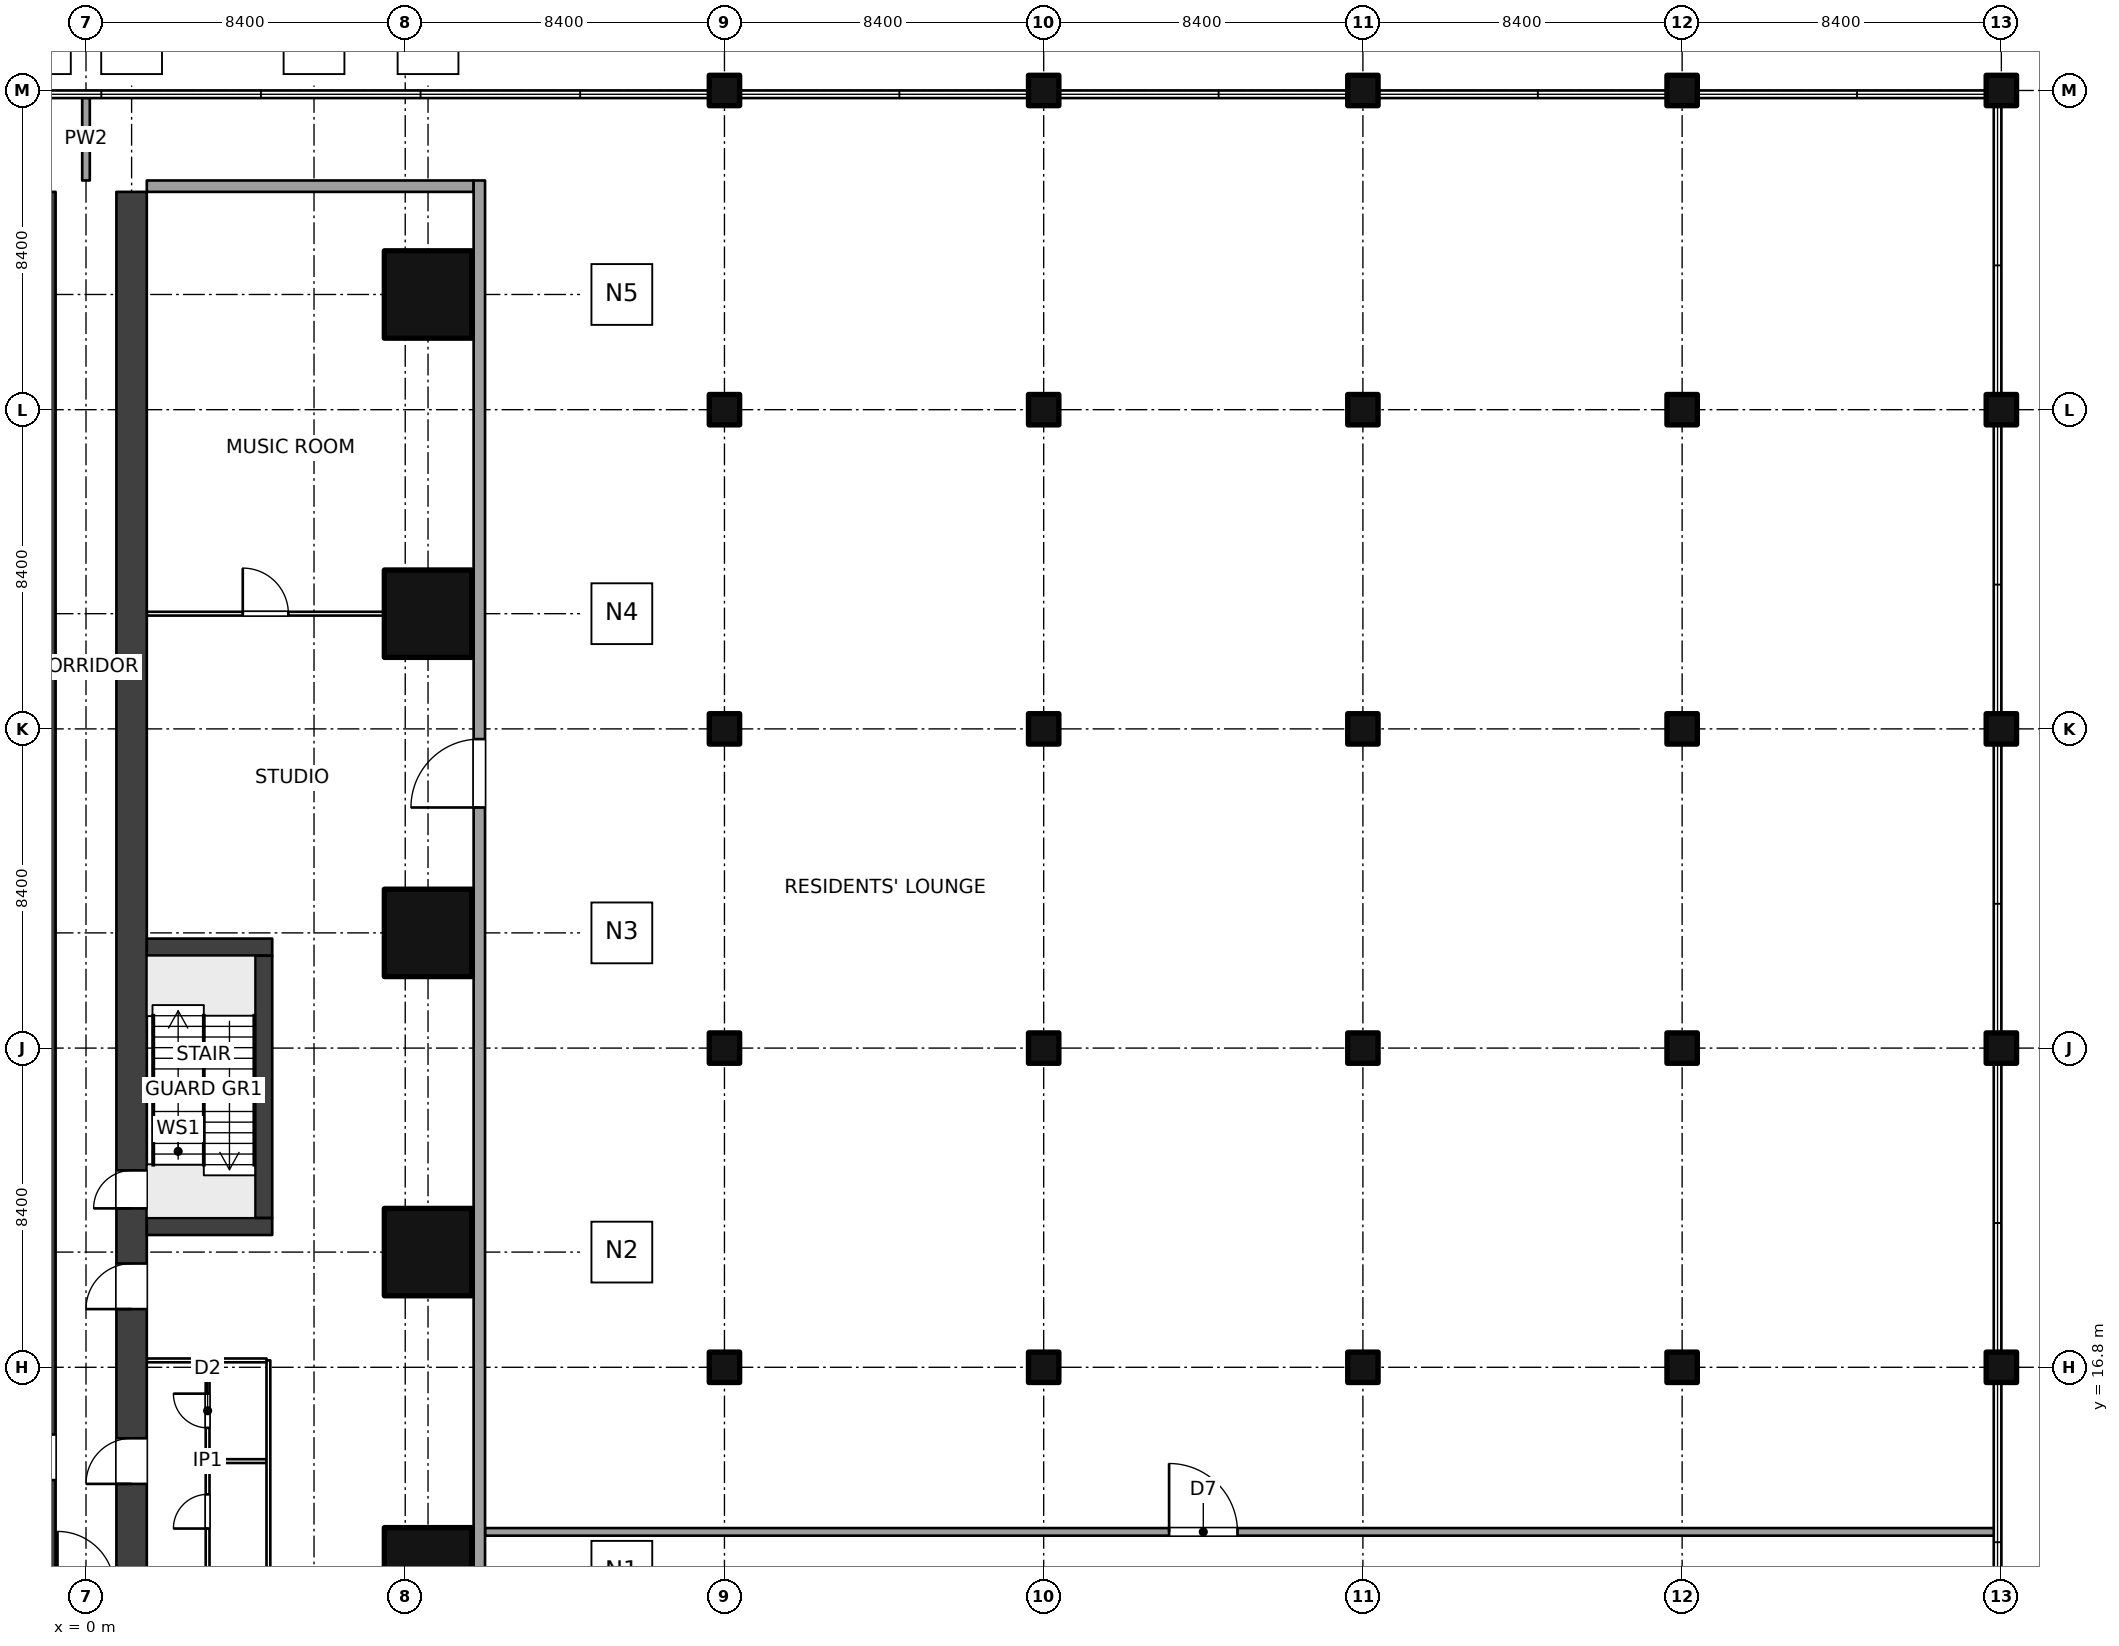
"""IFC4 building model, lengths in metres.
Left out: names, types, materials, properties, quantities, classifications, styles, units other than length and angle.
Written with IfcOpenShell. Run it as: python <this file> out.ifc"""

import sys

from ifc_helpers import new_model, si_unit, direction, frame, frame_2d, origin, origin_2d, place, context, subcontext, project, spatial, rectangle, extrude, element, fill, save


model = new_model("IFC4")
c1 = context("Model", 3, precision=1e-05, world=origin(), true_north=direction((0.0, 1.0)))
c2 = subcontext(c1, "Body", "Model", "MODEL_VIEW")
j1 = project(units=[si_unit("LENGTHUNIT", "METRE"), si_unit("PLANEANGLEUNIT", "RADIAN")], contexts=[c1])
p1 = place(None, origin())
s1 = spatial("IfcSite", under=j1, at=p1, CompositionType="ELEMENT")
p2 = place(p1, origin())
s2 = spatial("IfcBuilding", under=s1, at=p2, CompositionType="ELEMENT")
p3 = place(p2, frame((0.0, 0.0, 16.0)))
s3 = spatial("IfcBuildingStorey", under=s2, at=p3, CompositionType="ELEMENT", Elevation=16.0)
for number, where, z_axis, x_axis in (
    (1, (9.0, 11.432, 0.0), (0.0, 0.0, 1.0), (1.0, 0.0, 0.0)),
    (2, (9.0, 19.832, 0.0), (0.0, 0.0, 1.0), (1.0, 0.0, 0.0)),
    (3, (9.0, 28.231, 0.0), (0.0, 0.0, 1.0), (1.0, 0.0, 0.0)),
    (4, (9.0, 36.632, 0.0), (0.0, 0.0, 1.0), (1.0, 0.0, 0.0)),
    (5, (9.0, 45.031, 0.0), (0.0, 0.0, 1.0), (1.0, 0.0, 0.0)),
):
    element("IfcColumn", number, at=place(p3, frame(where, z_axis=z_axis, x_axis=x_axis)), inside=s3, PredefinedType="COLUMN", context=c2, shape_type="SweptSolid", body=[
        extrude(rectangle(XDim=2.3, YDim=2.3, at=origin_2d()), origin(), (0.0, 0.0, 1.0), 5.0),
    ])
for number, where, z_axis, x_axis in (
    (6, (16.8, 16.8, 0.0), (0.0, 0.0, 1.0), (1.0, 0.0, 0.0)),
    (7, (16.8, 25.2, 0.0), (0.0, 0.0, 1.0), (1.0, 0.0, 0.0)),
    (8, (16.8, 33.6, 0.0), (0.0, 0.0, 1.0), (1.0, 0.0, 0.0)),
    (9, (16.8, 42.0, 0.0), (0.0, 0.0, 1.0), (1.0, 0.0, 0.0)),
    (10, (16.8, 50.4, 0.0), (0.0, 0.0, 1.0), (1.0, 0.0, 0.0)),
    (11, (25.2, 16.8, 0.0), (0.0, 0.0, 1.0), (1.0, 0.0, 0.0)),
    (12, (25.2, 25.2, 0.0), (0.0, 0.0, 1.0), (1.0, 0.0, 0.0)),
    (13, (25.2, 33.6, 0.0), (0.0, 0.0, 1.0), (1.0, 0.0, 0.0)),
    (14, (25.2, 42.0, 0.0), (0.0, 0.0, 1.0), (1.0, 0.0, 0.0)),
    (15, (25.2, 50.4, 0.0), (0.0, 0.0, 1.0), (1.0, 0.0, 0.0)),
    (16, (33.6, 16.8, 0.0), (0.0, 0.0, 1.0), (1.0, 0.0, 0.0)),
    (17, (33.6, 25.2, 0.0), (0.0, 0.0, 1.0), (1.0, 0.0, 0.0)),
    (18, (33.6, 33.6, 0.0), (0.0, 0.0, 1.0), (1.0, 0.0, 0.0)),
    (19, (33.6, 42.0, 0.0), (0.0, 0.0, 1.0), (1.0, 0.0, 0.0)),
    (20, (33.6, 50.4, 0.0), (0.0, 0.0, 1.0), (1.0, 0.0, 0.0)),
    (21, (42.0, 16.8, 0.0), (0.0, 0.0, 1.0), (1.0, 0.0, 0.0)),
    (22, (42.0, 25.2, 0.0), (0.0, 0.0, 1.0), (1.0, 0.0, 0.0)),
    (23, (42.0, 33.6, 0.0), (0.0, 0.0, 1.0), (1.0, 0.0, 0.0)),
    (24, (42.0, 42.0, 0.0), (0.0, 0.0, 1.0), (1.0, 0.0, 0.0)),
    (25, (42.0, 50.4, 0.0), (0.0, 0.0, 1.0), (1.0, 0.0, 0.0)),
    (26, (50.4, 16.8, 0.0), (0.0, 0.0, 1.0), (1.0, 0.0, 0.0)),
    (27, (50.4, 25.2, 0.0), (0.0, 0.0, 1.0), (1.0, 0.0, 0.0)),
    (28, (50.4, 33.6, 0.0), (0.0, 0.0, 1.0), (1.0, 0.0, 0.0)),
    (29, (50.4, 42.0, 0.0), (0.0, 0.0, 1.0), (1.0, 0.0, 0.0)),
    (30, (50.4, 50.4, 0.0), (0.0, 0.0, 1.0), (1.0, 0.0, 0.0)),
):
    element("IfcColumn", number, at=place(p3, frame(where, z_axis=z_axis, x_axis=x_axis)), inside=s3, PredefinedType="COLUMN", context=c2, shape_type="SweptSolid", body=[
        extrude(rectangle(XDim=0.8, YDim=0.8, at=origin_2d()), origin(), (0.0, 0.0, 1.0), 5.0),
    ])
p4 = place(p3, frame((-1.2, 10.981, 0.0), z_axis=(0.0, 0.0, 1.0), x_axis=(0.0, 1.0, 0.0)))
e31 = element("IfcWall", 31, at=p4, inside=s3, PredefinedType="SHEAR", context=c2, shape_type="SweptSolid", body=[
    extrude(rectangle(XDim=36.75, YDim=0.8, at=frame_2d((18.375, 0.0))), origin(), (0.0, 0.0, 1.0), 5.0),
])
p5 = place(p4, frame((2.85, 0.0, 0.0)))
e32 = element("IfcOpeningElement", 32, at=p5, cuts=e31, PredefinedType="OPENING", context=c2, shape_type="SweptSolid", body=[
    extrude(rectangle(XDim=1.2, YDim=2.1, at=frame_2d((0.6, 1.05))), frame((0.0, 0.41, 0.0), z_axis=(0.0, -1.0, 0.0), x_axis=(1.0, 0.0, 0.0)), (0.0, 0.0, 1.0), 0.82),
])
p6 = place(p3, frame((1.2, 10.981, 0.0), z_axis=(0.0, 0.0, 1.0), x_axis=(0.0, 1.0, 0.0)))
e33 = element("IfcWall", 33, at=p6, inside=s3, PredefinedType="SHEAR", context=c2, shape_type="SweptSolid", body=[
    extrude(rectangle(XDim=36.75, YDim=0.8, at=frame_2d((18.375, 0.0))), origin(), (0.0, 0.0, 1.0), 5.0),
])
p7 = place(p6, frame((10.0, 0.0, 0.0)))
e34 = element("IfcOpeningElement", 34, at=p7, cuts=e33, PredefinedType="OPENING", context=c2, shape_type="SweptSolid", body=[
    extrude(rectangle(XDim=1.0, YDim=2.1, at=frame_2d((0.5, 1.05))), frame((0.0, 0.41, 0.0), z_axis=(0.0, -1.0, 0.0), x_axis=(1.0, 0.0, 0.0)), (0.0, 0.0, 1.0), 0.82),
])
p8 = place(p6, frame((2.75, 0.0, 0.0)))
e35 = element("IfcOpeningElement", 35, at=p8, cuts=e33, PredefinedType="OPENING", context=c2, shape_type="SweptSolid", body=[
    extrude(rectangle(XDim=1.2, YDim=2.1, at=frame_2d((0.6, 1.05))), frame((0.0, 0.41, 0.0), z_axis=(0.0, -1.0, 0.0), x_axis=(1.0, 0.0, 0.0)), (0.0, 0.0, 1.0), 0.82),
])
p9 = place(p6, frame((7.35, 0.0, 0.0)))
e36 = element("IfcOpeningElement", 36, at=p9, cuts=e33, PredefinedType="OPENING", context=c2, shape_type="SweptSolid", body=[
    extrude(rectangle(XDim=1.2, YDim=2.1, at=frame_2d((0.6, 1.05))), frame((0.0, 0.41, 0.0), z_axis=(0.0, -1.0, 0.0), x_axis=(1.0, 0.0, 0.0)), (0.0, 0.0, 1.0), 0.82),
])
p10 = place(p3, frame((3.2, 11.432, 0.0), z_axis=(0.0, 0.0, 1.0), x_axis=(0.0, 1.0, 0.0)))
e37 = element("IfcWall", 37, at=p10, inside=s3, PredefinedType="PARTITIONING", context=c2, shape_type="SweptSolid", body=[
    extrude(rectangle(XDim=5.6, YDim=0.1, at=frame_2d((2.8, 0.0))), origin(), (0.0, 0.0, 1.0), 4.7),
])
p11 = place(p10, frame((1.125, 0.0, 0.0)))
e38 = element("IfcOpeningElement", 38, at=p11, cuts=e37, PredefinedType="OPENING", context=c2, shape_type="SweptSolid", body=[
    extrude(rectangle(XDim=0.9, YDim=2.1, at=frame_2d((0.45, 1.05))), frame((0.0, 0.06, 0.0), z_axis=(0.0, -1.0, 0.0), x_axis=(1.0, 0.0, 0.0)), (0.0, 0.0, 1.0), 0.12),
])
p12 = place(p10, frame((3.775, 0.0, 0.0)))
e39 = element("IfcOpeningElement", 39, at=p12, cuts=e37, PredefinedType="OPENING", context=c2, shape_type="SweptSolid", body=[
    extrude(rectangle(XDim=0.9, YDim=2.1, at=frame_2d((0.45, 1.05))), frame((0.0, 0.06, 0.0), z_axis=(0.0, -1.0, 0.0), x_axis=(1.0, 0.0, 0.0)), (0.0, 0.0, 1.0), 0.12),
])
p13 = place(p3, frame((3.25, 14.332, 0.0), z_axis=(0.0, 0.0, 1.0), x_axis=(1.0, 0.0, 0.0)))
e40 = element("IfcWall", 40, at=p13, inside=s3, PredefinedType="PARTITIONING", context=c2, shape_type="SweptSolid", body=[
    extrude(rectangle(XDim=1.5, YDim=0.1, at=frame_2d((0.75, 0.0))), origin(), (0.0, 0.0, 1.0), 4.7),
])
p14 = place(p3, frame((4.8, 11.432, 0.0), z_axis=(0.0, 0.0, 1.0), x_axis=(0.0, 1.0, 0.0)))
e41 = element("IfcWall", 41, at=p14, inside=s3, PredefinedType="PARTITIONING", context=c2, shape_type="SweptSolid", body=[
    extrude(rectangle(XDim=5.55, YDim=0.1, at=frame_2d((2.775, 0.0))), origin(), (0.0, 0.0, 1.0), 4.7),
])
p15 = place(p3, frame((1.6, 16.981, 0.0), z_axis=(0.0, 0.0, 1.0), x_axis=(1.0, 0.0, 0.0)))
e42 = element("IfcWall", 42, at=p15, inside=s3, PredefinedType="PARTITIONING", context=c2, shape_type="SweptSolid", body=[
    extrude(rectangle(XDim=3.15, YDim=0.1, at=frame_2d((1.575, 0.0))), origin(), (0.0, 0.0, 1.0), 4.7),
])
p16 = place(p3, frame((1.6, 36.632, 0.0), z_axis=(0.0, 0.0, 1.0), x_axis=(1.0, 0.0, 0.0)))
e43 = element("IfcWall", 43, at=p16, inside=s3, PredefinedType="PARTITIONING", context=c2, shape_type="SweptSolid", body=[
    extrude(rectangle(XDim=6.25, YDim=0.1, at=frame_2d((3.125, 0.0))), origin(), (0.0, 0.0, 1.0), 2.9),
])
p17 = place(p16, frame((2.525, 0.0, 0.0)))
e44 = element("IfcOpeningElement", 44, at=p17, cuts=e43, PredefinedType="OPENING", context=c2, shape_type="SweptSolid", body=[
    extrude(rectangle(XDim=1.2, YDim=2.1, at=frame_2d((0.6, 1.05))), frame((0.0, 0.06, 0.0), z_axis=(0.0, -1.0, 0.0), x_axis=(1.0, 0.0, 0.0)), (0.0, 0.0, 1.0), 0.12),
])
p18 = place(p3, frame((0.0, 48.031, 0.0), z_axis=(0.0, 0.0, 1.0), x_axis=(0.0, 1.0, 0.0)))
e45 = element("IfcWall", 45, at=p18, inside=s3, PredefinedType="SOLIDWALL", context=c2, shape_type="SweptSolid", body=[
    extrude(rectangle(XDim=2.176, YDim=0.2, at=frame_2d((1.088, 0.0))), origin(), (0.0, 0.0, 1.0), 4.7),
])
p19 = place(p3, frame((10.5, 12.469, 0.0), z_axis=(0.0, 0.0, 1.0), x_axis=(1.0, 0.0, 0.0)))
e46 = element("IfcWall", 46, at=p19, inside=s3, PredefinedType="SOLIDWALL", context=c2, shape_type="SweptSolid", body=[
    extrude(rectangle(XDim=39.737, YDim=0.2, at=frame_2d((19.869, 0.0))), origin(), (0.0, 0.0, 1.0), 4.7),
])
p20 = place(p19, frame((18.0, 0.0, 0.0)))
e47 = element("IfcOpeningElement", 47, at=p20, cuts=e46, PredefinedType="OPENING", context=c2, shape_type="SweptSolid", body=[
    extrude(rectangle(XDim=1.8, YDim=2.4, at=frame_2d((0.9, 1.2))), frame((0.0, 0.11, 0.0), z_axis=(0.0, -1.0, 0.0), x_axis=(1.0, 0.0, 0.0)), (0.0, 0.0, 1.0), 0.22),
])
p21 = place(p3, frame((1.6, 47.882, 0.0), z_axis=(0.0, 0.0, 1.0), x_axis=(1.0, 0.0, 0.0)))
e48 = element("IfcWall", 48, at=p21, inside=s3, PredefinedType="SOLIDWALL", context=c2, shape_type="SweptSolid", body=[
    extrude(rectangle(XDim=8.6, YDim=0.3, at=frame_2d((4.3, 0.0))), origin(), (0.0, 0.0, 1.0), 3.1),
])
p22 = place(p3, frame((10.35, 6.149, 0.0), z_axis=(0.0, 0.0, 1.0), x_axis=(0.0, 1.0, 0.0)))
e49 = element("IfcWall", 49, at=p22, inside=s3, PredefinedType="SOLIDWALL", context=c2, shape_type="SweptSolid", body=[
    extrude(rectangle(XDim=41.883, YDim=0.3, at=frame_2d((20.941, 0.0))), origin(), (0.0, 0.0, 1.0), 4.7),
])
p23 = place(p22, frame((25.383, 0.0, 0.0)))
e50 = element("IfcOpeningElement", 50, at=p23, cuts=e49, PredefinedType="OPENING", context=c2, shape_type="SweptSolid", body=[
    extrude(rectangle(XDim=1.8, YDim=2.4, at=frame_2d((0.9, 1.2))), frame((0.0, 0.16, 0.0), z_axis=(0.0, -1.0, 0.0), x_axis=(1.0, 0.0, 0.0)), (0.0, 0.0, 1.0), 0.32),
])
for number, where, z_axis, x_axis in (
    (51, (1.6, 20.507, 0.0), (0.0, 0.0, 1.0), (1.0, 0.0, 0.0)),
    (52, (1.6, 27.856, 0.0), (0.0, 0.0, 1.0), (1.0, 0.0, 0.0)),
):
    element("IfcWall", number, at=place(p3, frame(where, z_axis=z_axis, x_axis=x_axis)), inside=s3, PredefinedType="SOLIDWALL", context=c2, shape_type="SweptSolid", body=[
        extrude(rectangle(XDim=3.3, YDim=0.45, at=frame_2d((1.65, 0.0))), origin(), (0.0, 0.0, 1.0), 5.0),
    ])
p24 = place(p3, frame((4.675, 20.731, 0.0), z_axis=(0.0, 0.0, 1.0), x_axis=(0.0, 1.0, 0.0)))
e53 = element("IfcWall", 53, at=p24, inside=s3, PredefinedType="SOLIDWALL", context=c2, shape_type="SweptSolid", body=[
    extrude(rectangle(XDim=6.9, YDim=0.45, at=frame_2d((3.45, 0.0))), origin(), (0.0, 0.0, 1.0), 5.0),
])
p25 = place(p7, origin())
e54 = element("IfcDoor", 54, at=p25, inside=s3, OperationType="SINGLE_SWING_LEFT", PredefinedType="DOOR", context=c2, shape_type="SweptSolid", body=[
    extrude(rectangle(XDim=1.0, YDim=2.1, at=frame_2d((0.5, 1.05))), frame((0.0, 0.025, 0.0), z_axis=(0.0, -1.0, 0.0), x_axis=(1.0, 0.0, 0.0)), (0.0, 0.0, 1.0), 0.05),
])
fill(e34, e54)
p26 = place(p11, origin())
e55 = element("IfcDoor", 55, at=p26, inside=s3, OperationType="SINGLE_SWING_LEFT", PredefinedType="DOOR", context=c2, shape_type="SweptSolid", body=[
    extrude(rectangle(XDim=0.9, YDim=2.1, at=frame_2d((0.45, 1.05))), frame((0.0, 0.025, 0.0), z_axis=(0.0, -1.0, 0.0), x_axis=(1.0, 0.0, 0.0)), (0.0, 0.0, 1.0), 0.05),
])
fill(e38, e55)
p27 = place(p12, origin())
e56 = element("IfcDoor", 56, at=p27, inside=s3, OperationType="SINGLE_SWING_RIGHT", PredefinedType="DOOR", context=c2, shape_type="SweptSolid", body=[
    extrude(rectangle(XDim=0.9, YDim=2.1, at=frame_2d((0.45, 1.05))), frame((0.0, 0.025, 0.0), z_axis=(0.0, -1.0, 0.0), x_axis=(1.0, 0.0, 0.0)), (0.0, 0.0, 1.0), 0.05),
])
fill(e39, e56)
p28 = place(p8, origin())
e57 = element("IfcDoor", 57, at=p28, inside=s3, OperationType="DOUBLE_SWING_LEFT", PredefinedType="DOOR", context=c2, shape_type="SweptSolid", body=[
    extrude(rectangle(XDim=1.2, YDim=2.1, at=frame_2d((0.6, 1.05))), frame((0.0, 0.025, 0.0), z_axis=(0.0, -1.0, 0.0), x_axis=(1.0, 0.0, 0.0)), (0.0, 0.0, 1.0), 0.05),
])
fill(e35, e57)
p29 = place(p17, origin())
e58 = element("IfcDoor", 58, at=p29, inside=s3, OperationType="DOUBLE_SWING_LEFT", PredefinedType="DOOR", context=c2, shape_type="SweptSolid", body=[
    extrude(rectangle(XDim=1.2, YDim=2.1, at=frame_2d((0.6, 1.05))), frame((0.0, 0.025, 0.0), z_axis=(0.0, -1.0, 0.0), x_axis=(1.0, 0.0, 0.0)), (0.0, 0.0, 1.0), 0.05),
])
fill(e44, e58)
p30 = place(p9, origin())
e59 = element("IfcDoor", 59, at=p30, inside=s3, OperationType="DOUBLE_SWING_LEFT", PredefinedType="DOOR", context=c2, shape_type="SweptSolid", body=[
    extrude(rectangle(XDim=1.2, YDim=2.1, at=frame_2d((0.6, 1.05))), frame((0.0, 0.025, 0.0), z_axis=(0.0, -1.0, 0.0), x_axis=(1.0, 0.0, 0.0)), (0.0, 0.0, 1.0), 0.05),
])
fill(e36, e59)
p31 = place(p20, origin())
e60 = element("IfcDoor", 60, at=p31, inside=s3, OperationType="DOUBLE_DOOR_DOUBLE_SWING", PredefinedType="DOOR", context=c2, shape_type="SweptSolid", body=[
    extrude(rectangle(XDim=1.8, YDim=2.4, at=frame_2d((0.9, 1.2))), frame((0.0, 0.025, 0.0), z_axis=(0.0, -1.0, 0.0), x_axis=(1.0, 0.0, 0.0)), (0.0, 0.0, 1.0), 0.05),
])
fill(e47, e60)
p32 = place(p23, origin())
e61 = element("IfcDoor", 61, at=p32, inside=s3, OperationType="DOUBLE_DOOR_DOUBLE_SWING", PredefinedType="DOOR", context=c2, shape_type="SweptSolid", body=[
    extrude(rectangle(XDim=1.8, YDim=2.4, at=frame_2d((0.9, 1.2))), frame((0.0, 0.025, 0.0), z_axis=(0.0, -1.0, 0.0), x_axis=(1.0, 0.0, 0.0)), (0.0, 0.0, 1.0), 0.05),
])
fill(e50, e61)
save(model, sys.argv[1])
